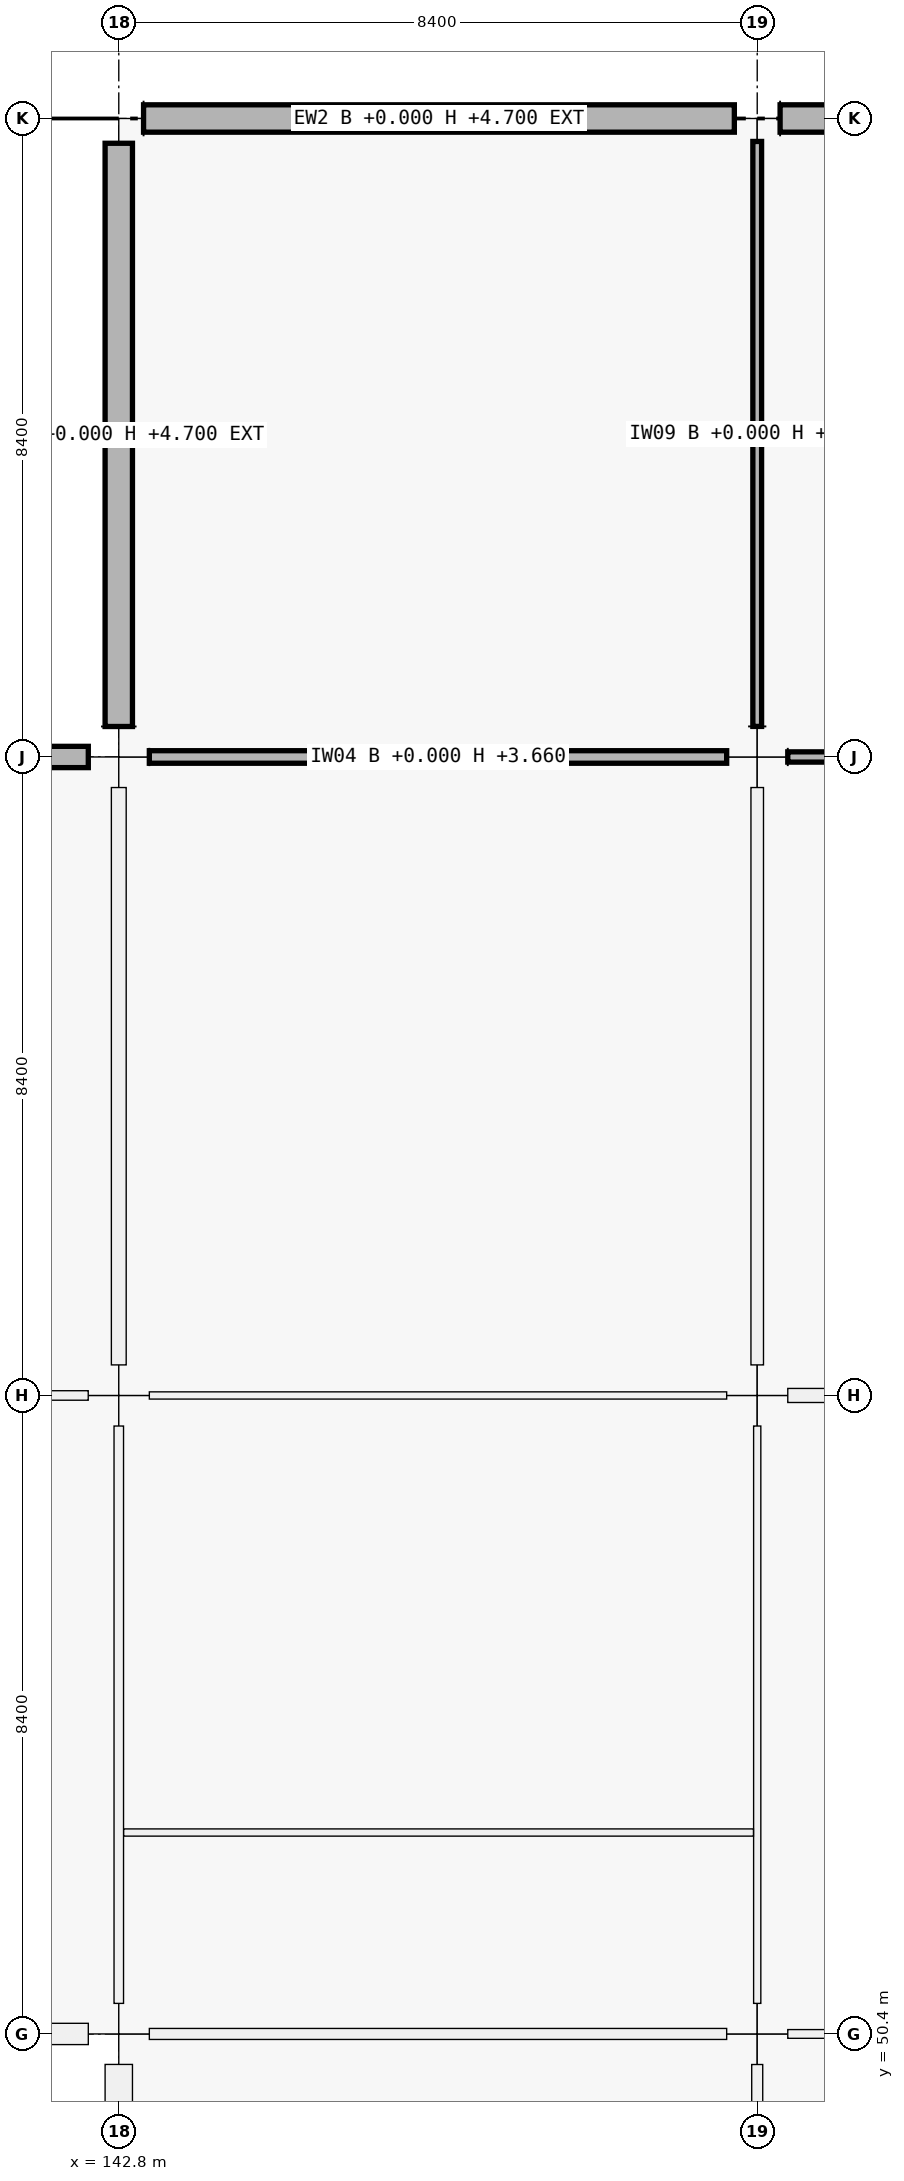
"""IFC4 building model, lengths in metres.
Left out: names, types, materials, properties, quantities, classifications, styles, units other than length and angle.
Written with IfcOpenShell. Run it as: python <this file> out.ifc"""

import sys

from ifc_helpers import new_model, si_unit, direction, frame, frame_2d, origin, origin_2d, place, context, subcontext, project, spatial, rectangle, extrude, element, fill, save


model = new_model("IFC4")
c1 = context("Model", 3, precision=1e-05, world=origin(), true_north=direction((0.0, 1.0)))
c2 = subcontext(c1, "Body", "Model", "MODEL_VIEW")
j1 = project(units=[si_unit("LENGTHUNIT", "METRE"), si_unit("PLANEANGLEUNIT", "RADIAN")], contexts=[c1])
p1 = place(None, origin())
s1 = spatial("IfcSite", under=j1, at=p1, CompositionType="ELEMENT")
p2 = place(p1, origin())
s2 = spatial("IfcBuilding", under=s1, at=p2, CompositionType="ELEMENT")
p3 = place(p2, origin())
s3 = spatial("IfcBuildingStorey", under=s2, at=p3, CompositionType="ELEMENT", Elevation=0.0)
for number, where, z_axis, x_axis in (
    (1, (142.8, 50.4, 0.0), (0.0, 0.0, 1.0), (1.0, 0.0, 0.0)),
    (2, (142.8, 58.8, 0.0), (0.0, 0.0, 1.0), (1.0, 0.0, 0.0)),
    (3, (142.8, 67.2, 0.0), (0.0, 0.0, 1.0), (1.0, 0.0, 0.0)),
):
    element("IfcColumn", number, at=place(p3, frame(where, z_axis=z_axis, x_axis=x_axis)), inside=s3, PredefinedType="COLUMN", context=c2, shape_type="SweptSolid", body=[
        extrude(rectangle(XDim=0.8, YDim=0.8, at=origin_2d()), origin(), (0.0, 0.0, 1.0), 5.76),
    ])
p4 = place(p3, frame((142.8, 75.6, 0.0), z_axis=(0.0, 0.0, 1.0), x_axis=(1.0, 0.0, 0.0)))
e4 = element("IfcColumn", 4, at=p4, inside=s3, PredefinedType="COLUMN", context=c2, shape_type="SweptSolid", body=[
    extrude(rectangle(XDim=0.65, YDim=0.65, at=origin_2d()), origin(), (0.0, 0.0, 1.0), 5.76),
])
for number, where, z_axis, x_axis in (
    (5, (151.2, 50.4, 0.0), (0.0, 0.0, 1.0), (1.0, 0.0, 0.0)),
    (6, (151.2, 58.8, 0.0), (0.0, 0.0, 1.0), (1.0, 0.0, 0.0)),
    (7, (151.2, 67.2, 0.0), (0.0, 0.0, 1.0), (1.0, 0.0, 0.0)),
):
    element("IfcColumn", number, at=place(p3, frame(where, z_axis=z_axis, x_axis=x_axis)), inside=s3, PredefinedType="COLUMN", context=c2, shape_type="SweptSolid", body=[
        extrude(rectangle(XDim=0.8, YDim=0.8, at=origin_2d()), origin(), (0.0, 0.0, 1.0), 5.76),
    ])
p5 = place(p3, frame((151.2, 75.6, 0.0), z_axis=(0.0, 0.0, 1.0), x_axis=(1.0, 0.0, 0.0)))
e8 = element("IfcColumn", 8, at=p5, inside=s3, PredefinedType="COLUMN", context=c2, shape_type="SweptSolid", body=[
    extrude(rectangle(XDim=0.6, YDim=0.6, at=origin_2d()), origin(), (0.0, 0.0, 1.0), 5.76),
])
p6 = place(p3, frame((142.399, 50.4, 0.0), z_axis=(0.0, 0.0, 1.0), x_axis=(-1.0, 0.0, 0.0)))
e9 = element("IfcWall", 9, at=p6, inside=s3, PredefinedType="SOLIDWALL", context=c2, shape_type="SweptSolid", body=[
    extrude(rectangle(XDim=7.598, YDim=0.28, at=frame_2d((3.799, 0.0))), origin(), (0.0, 0.0, 1.0), 4.7),
])
p7 = place(p3, frame((134.776, 67.2, 0.0), z_axis=(0.0, 0.0, 1.0), x_axis=(1.0, 0.0, 0.0)))
e10 = element("IfcWall", 10, at=p7, inside=s3, PredefinedType="SOLIDWALL", context=c2, shape_type="SweptSolid", body=[
    extrude(rectangle(XDim=7.623, YDim=0.28, at=frame_2d((3.812, 0.0))), origin(), (0.0, 0.0, 1.0), 4.7),
])
p8 = place(p7, frame((2.537, 0.0, 0.9)))
e11 = element("IfcOpeningElement", 11, at=p8, cuts=e10, PredefinedType="OPENING", context=c2, shape_type="SweptSolid", body=[
    extrude(rectangle(XDim=2.55, YDim=1.95, at=frame_2d((1.275, 0.975))), frame((0.0, 0.14, 0.0), z_axis=(0.0, -1.0, 0.0), x_axis=(1.0, 0.0, 0.0)), (0.0, 0.0, 1.0), 0.28),
])
p9 = place(p3, frame((142.8, 42.401, 0.0), z_axis=(0.0, 0.0, 1.0), x_axis=(0.0, 1.0, 0.0)))
e12 = element("IfcWall", 12, at=p9, inside=s3, PredefinedType="SOLIDWALL", context=c2, shape_type="SweptSolid", body=[
    extrude(rectangle(XDim=7.598, YDim=0.36, at=frame_2d((3.799, 0.0))), origin(), (0.0, 0.0, 1.0), 4.7),
])
p10 = place(p9, frame((2.574, 0.0, 0.9)))
e13 = element("IfcOpeningElement", 13, at=p10, cuts=e12, PredefinedType="OPENING", context=c2, shape_type="SweptSolid", body=[
    extrude(rectangle(XDim=2.45, YDim=1.45, at=frame_2d((1.225, 0.725))), frame((0.0, 0.18, 0.0), z_axis=(0.0, -1.0, 0.0), x_axis=(1.0, 0.0, 0.0)), (0.0, 0.0, 1.0), 0.36),
])
p11 = place(p3, frame((142.8, 67.601, 0.0), z_axis=(0.0, 0.0, 1.0), x_axis=(0.0, 1.0, 0.0)))
e14 = element("IfcWall", 14, at=p11, inside=s3, PredefinedType="SOLIDWALL", context=c2, shape_type="SweptSolid", body=[
    extrude(rectangle(XDim=7.673, YDim=0.36, at=frame_2d((3.836, 0.0))), origin(), (0.0, 0.0, 1.0), 4.7),
])
p12 = place(p11, frame((2.937, 0.0, 0.9)))
e15 = element("IfcOpeningElement", 15, at=p12, cuts=e14, PredefinedType="OPENING", context=c2, shape_type="SweptSolid", body=[
    extrude(rectangle(XDim=1.8, YDim=1.8, at=frame_2d((0.9, 0.9))), frame((0.0, 0.18, 0.0), z_axis=(0.0, -1.0, 0.0), x_axis=(1.0, 0.0, 0.0)), (0.0, 0.0, 1.0), 0.36),
])
p13 = place(p3, frame((143.126, 75.6, 0.0), z_axis=(0.0, 0.0, 1.0), x_axis=(1.0, 0.0, 0.0)))
e16 = element("IfcWall", 16, at=p13, inside=s3, PredefinedType="SOLIDWALL", context=c2, shape_type="SweptSolid", body=[
    extrude(rectangle(XDim=7.773, YDim=0.36, at=frame_2d((3.886, 0.0))), origin(), (0.0, 0.0, 1.0), 4.7),
])
p14 = place(p13, frame((2.837, 0.0, 0.9)))
e17 = element("IfcOpeningElement", 17, at=p14, cuts=e16, PredefinedType="OPENING", context=c2, shape_type="SweptSolid", body=[
    extrude(rectangle(XDim=2.1, YDim=1.8, at=frame_2d((1.05, 0.9))), frame((0.0, 0.18, 0.0), z_axis=(0.0, -1.0, 0.0), x_axis=(1.0, 0.0, 0.0)), (0.0, 0.0, 1.0), 0.36),
])
p15 = place(p3, frame((151.501, 75.6, 0.0), z_axis=(0.0, 0.0, 1.0), x_axis=(1.0, 0.0, 0.0)))
e18 = element("IfcWall", 18, at=p15, inside=s3, PredefinedType="SOLIDWALL", context=c2, shape_type="SweptSolid", body=[
    extrude(rectangle(XDim=7.773, YDim=0.36, at=frame_2d((3.886, 0.0))), origin(), (0.0, 0.0, 1.0), 4.7),
])
p16 = place(p15, frame((2.686, 0.0, 0.9)))
e19 = element("IfcOpeningElement", 19, at=p16, cuts=e18, PredefinedType="OPENING", context=c2, shape_type="SweptSolid", body=[
    extrude(rectangle(XDim=2.4, YDim=1.8, at=frame_2d((1.2, 0.9))), frame((0.0, 0.18, 0.0), z_axis=(0.0, -1.0, 0.0), x_axis=(1.0, 0.0, 0.0)), (0.0, 0.0, 1.0), 0.36),
])
p17 = place(p3, frame((134.802, 58.8, 0.0), z_axis=(0.0, 0.0, 1.0), x_axis=(1.0, 0.0, 0.0)))
e20 = element("IfcWall", 20, at=p17, inside=s3, PredefinedType="PARTITIONING", context=c2, shape_type="SweptSolid", body=[
    extrude(rectangle(XDim=7.596, YDim=0.125, at=frame_2d((3.798, 0.0))), origin(), (0.0, 0.0, 1.0), 3.66),
])
p18 = place(p17, frame((3.293, 0.0, 0.0)))
e21 = element("IfcOpeningElement", 21, at=p18, cuts=e20, PredefinedType="OPENING", context=c2, shape_type="SweptSolid", body=[
    extrude(rectangle(XDim=1.01, YDim=2.12, at=frame_2d((0.505, 1.06))), frame((0.0, 0.062, 0.0), z_axis=(0.0, -1.0, 0.0), x_axis=(1.0, 0.0, 0.0)), (0.0, 0.0, 1.0), 0.125),
])
p19 = place(p3, frame((143.202, 50.4, 0.0), z_axis=(0.0, 0.0, 1.0), x_axis=(1.0, 0.0, 0.0)))
e22 = element("IfcWall", 22, at=p19, inside=s3, PredefinedType="PARTITIONING", context=c2, shape_type="SweptSolid", body=[
    extrude(rectangle(XDim=7.596, YDim=0.145, at=frame_2d((3.798, 0.0))), origin(), (0.0, 0.0, 1.0), 3.66),
])
p20 = place(p3, frame((143.202, 58.8, 0.0), z_axis=(0.0, 0.0, 1.0), x_axis=(1.0, 0.0, 0.0)))
e23 = element("IfcWall", 23, at=p20, inside=s3, PredefinedType="PARTITIONING", context=c2, shape_type="SweptSolid", body=[
    extrude(rectangle(XDim=7.596, YDim=0.095, at=frame_2d((3.798, 0.0))), origin(), (0.0, 0.0, 1.0), 3.66),
])
p21 = place(p3, frame((143.202, 67.2, 0.0), z_axis=(0.0, 0.0, 1.0), x_axis=(1.0, 0.0, 0.0)))
e24 = element("IfcWall", 24, at=p21, inside=s3, PredefinedType="PARTITIONING", context=c2, shape_type="SweptSolid", body=[
    extrude(rectangle(XDim=7.596, YDim=0.165, at=frame_2d((3.798, 0.0))), origin(), (0.0, 0.0, 1.0), 3.66),
])
p22 = place(p21, frame((3.278, 0.0, 0.0)))
e25 = element("IfcOpeningElement", 25, at=p22, cuts=e24, PredefinedType="OPENING", context=c2, shape_type="SweptSolid", body=[
    extrude(rectangle(XDim=1.04, YDim=2.2, at=frame_2d((0.52, 1.1))), frame((0.0, 0.083, 0.0), z_axis=(0.0, -1.0, 0.0), x_axis=(1.0, 0.0, 0.0)), (0.0, 0.0, 1.0), 0.165),
])
p23 = place(p3, frame((151.602, 50.4, 0.0), z_axis=(0.0, 0.0, 1.0), x_axis=(1.0, 0.0, 0.0)))
e26 = element("IfcWall", 26, at=p23, inside=s3, PredefinedType="PARTITIONING", context=c2, shape_type="SweptSolid", body=[
    extrude(rectangle(XDim=7.596, YDim=0.115, at=frame_2d((3.798, 0.0))), origin(), (0.0, 0.0, 1.0), 3.66),
])
p24 = place(p23, frame((3.308, 0.0, 0.0)))
e27 = element("IfcOpeningElement", 27, at=p24, cuts=e26, PredefinedType="OPENING", context=c2, shape_type="SweptSolid", body=[
    extrude(rectangle(XDim=0.98, YDim=2.18, at=frame_2d((0.49, 1.09))), frame((0.0, 0.058, 0.0), z_axis=(0.0, -1.0, 0.0), x_axis=(1.0, 0.0, 0.0)), (0.0, 0.0, 1.0), 0.115),
])
p25 = place(p3, frame((151.602, 58.8, 0.0), z_axis=(0.0, 0.0, 1.0), x_axis=(1.0, 0.0, 0.0)))
e28 = element("IfcWall", 28, at=p25, inside=s3, PredefinedType="PARTITIONING", context=c2, shape_type="SweptSolid", body=[
    extrude(rectangle(XDim=7.596, YDim=0.185, at=frame_2d((3.798, 0.0))), origin(), (0.0, 0.0, 1.0), 3.66),
])
p26 = place(p25, frame((3.318, 0.0, 0.0)))
e29 = element("IfcOpeningElement", 29, at=p26, cuts=e28, PredefinedType="OPENING", context=c2, shape_type="SweptSolid", body=[
    extrude(rectangle(XDim=0.96, YDim=2.18, at=frame_2d((0.48, 1.09))), frame((0.0, 0.093, 0.0), z_axis=(0.0, -1.0, 0.0), x_axis=(1.0, 0.0, 0.0)), (0.0, 0.0, 1.0), 0.185),
])
p27 = place(p3, frame((151.602, 67.2, 0.0), z_axis=(0.0, 0.0, 1.0), x_axis=(1.0, 0.0, 0.0)))
e30 = element("IfcWall", 30, at=p27, inside=s3, PredefinedType="PARTITIONING", context=c2, shape_type="SweptSolid", body=[
    extrude(rectangle(XDim=7.596, YDim=0.135, at=frame_2d((3.798, 0.0))), origin(), (0.0, 0.0, 1.0), 3.66),
])
p28 = place(p27, frame((3.328, 0.0, 0.0)))
e31 = element("IfcOpeningElement", 31, at=p28, cuts=e30, PredefinedType="OPENING", context=c2, shape_type="SweptSolid", body=[
    extrude(rectangle(XDim=0.94, YDim=2.15, at=frame_2d((0.47, 1.075))), frame((0.0, 0.067, 0.0), z_axis=(0.0, -1.0, 0.0), x_axis=(1.0, 0.0, 0.0)), (0.0, 0.0, 1.0), 0.135),
])
p29 = place(p3, frame((142.8, 50.802, 0.0), z_axis=(0.0, 0.0, 1.0), x_axis=(0.0, 1.0, 0.0)))
e32 = element("IfcWall", 32, at=p29, inside=s3, PredefinedType="PARTITIONING", context=c2, shape_type="SweptSolid", body=[
    extrude(rectangle(XDim=7.596, YDim=0.125, at=frame_2d((3.798, 0.0))), origin(), (0.0, 0.0, 1.0), 3.66),
])
p30 = place(p29, frame((0.593, 0.0, 0.0)))
e33 = element("IfcOpeningElement", 33, at=p30, cuts=e32, PredefinedType="OPENING", context=c2, shape_type="SweptSolid", body=[
    extrude(rectangle(XDim=0.94, YDim=2.08, at=frame_2d((0.47, 1.04))), frame((0.0, 0.062, 0.0), z_axis=(0.0, -1.0, 0.0), x_axis=(1.0, 0.0, 0.0)), (0.0, 0.0, 1.0), 0.125),
])
p31 = place(p29, frame((4.503, 0.0, 0.0)))
e34 = element("IfcOpeningElement", 34, at=p31, cuts=e32, PredefinedType="OPENING", context=c2, shape_type="SweptSolid", body=[
    extrude(rectangle(XDim=0.96, YDim=2.1, at=frame_2d((0.48, 1.05))), frame((0.0, 0.062, 0.0), z_axis=(0.0, -1.0, 0.0), x_axis=(1.0, 0.0, 0.0)), (0.0, 0.0, 1.0), 0.125),
])
p32 = place(p3, frame((142.8, 59.202, 0.0), z_axis=(0.0, 0.0, 1.0), x_axis=(0.0, 1.0, 0.0)))
e35 = element("IfcWall", 35, at=p32, inside=s3, PredefinedType="PARTITIONING", context=c2, shape_type="SweptSolid", body=[
    extrude(rectangle(XDim=7.596, YDim=0.195, at=frame_2d((3.798, 0.0))), origin(), (0.0, 0.0, 1.0), 3.66),
])
p33 = place(p32, frame((3.268, 0.0, 0.0)))
e36 = element("IfcOpeningElement", 36, at=p33, cuts=e35, PredefinedType="OPENING", context=c2, shape_type="SweptSolid", body=[
    extrude(rectangle(XDim=1.06, YDim=2.25, at=frame_2d((0.53, 1.125))), frame((0.0, 0.098, 0.0), z_axis=(0.0, -1.0, 0.0), x_axis=(1.0, 0.0, 0.0)), (0.0, 0.0, 1.0), 0.195),
])
p34 = place(p3, frame((151.2, 42.352, 0.0), z_axis=(0.0, 0.0, 1.0), x_axis=(0.0, 1.0, 0.0)))
e37 = element("IfcWall", 37, at=p34, inside=s3, PredefinedType="PARTITIONING", context=c2, shape_type="SweptSolid", body=[
    extrude(rectangle(XDim=7.646, YDim=0.145, at=frame_2d((3.823, 0.0))), origin(), (0.0, 0.0, 1.0), 3.66),
])
p35 = place(p34, frame((3.333, 0.0, 0.0)))
e38 = element("IfcOpeningElement", 38, at=p35, cuts=e37, PredefinedType="OPENING", context=c2, shape_type="SweptSolid", body=[
    extrude(rectangle(XDim=0.98, YDim=2.18, at=frame_2d((0.49, 1.09))), frame((0.0, 0.073, 0.0), z_axis=(0.0, -1.0, 0.0), x_axis=(1.0, 0.0, 0.0)), (0.0, 0.0, 1.0), 0.145),
])
p36 = place(p3, frame((151.2, 50.802, 0.0), z_axis=(0.0, 0.0, 1.0), x_axis=(0.0, 1.0, 0.0)))
e39 = element("IfcWall", 39, at=p36, inside=s3, PredefinedType="PARTITIONING", context=c2, shape_type="SweptSolid", body=[
    extrude(rectangle(XDim=7.596, YDim=0.095, at=frame_2d((3.798, 0.0))), origin(), (0.0, 0.0, 1.0), 3.66),
])
p37 = place(p3, frame((151.2, 59.202, 0.0), z_axis=(0.0, 0.0, 1.0), x_axis=(0.0, 1.0, 0.0)))
e40 = element("IfcWall", 40, at=p37, inside=s3, PredefinedType="PARTITIONING", context=c2, shape_type="SweptSolid", body=[
    extrude(rectangle(XDim=7.596, YDim=0.165, at=frame_2d((3.798, 0.0))), origin(), (0.0, 0.0, 1.0), 3.66),
])
p38 = place(p37, frame((3.318, 0.0, 0.0)))
e41 = element("IfcOpeningElement", 41, at=p38, cuts=e40, PredefinedType="OPENING", context=c2, shape_type="SweptSolid", body=[
    extrude(rectangle(XDim=0.96, YDim=2.18, at=frame_2d((0.48, 1.09))), frame((0.0, 0.083, 0.0), z_axis=(0.0, -1.0, 0.0), x_axis=(1.0, 0.0, 0.0)), (0.0, 0.0, 1.0), 0.165),
])
p39 = place(p3, frame((151.2, 67.602, 0.0), z_axis=(0.0, 0.0, 1.0), x_axis=(0.0, 1.0, 0.0)))
e42 = element("IfcWall", 42, at=p39, inside=s3, PredefinedType="PARTITIONING", context=c2, shape_type="SweptSolid", body=[
    extrude(rectangle(XDim=7.696, YDim=0.115, at=frame_2d((3.848, 0.0))), origin(), (0.0, 0.0, 1.0), 3.66),
])
p40 = place(p39, frame((3.378, 0.0, 0.0)))
e43 = element("IfcOpeningElement", 43, at=p40, cuts=e42, PredefinedType="OPENING", context=c2, shape_type="SweptSolid", body=[
    extrude(rectangle(XDim=0.94, YDim=2.15, at=frame_2d((0.47, 1.075))), frame((0.0, 0.058, 0.0), z_axis=(0.0, -1.0, 0.0), x_axis=(1.0, 0.0, 0.0)), (0.0, 0.0, 1.0), 0.115),
])
p41 = place(p3, frame((142.865, 53.05, 0.0), z_axis=(0.0, 0.0, 1.0), x_axis=(1.0, 0.0, 0.0)))
e44 = element("IfcWall", 44, at=p41, inside=s3, PredefinedType="PARTITIONING", context=c2, shape_type="SweptSolid", body=[
    extrude(rectangle(XDim=8.286, YDim=0.095, at=frame_2d((4.143, 0.0))), origin(), (0.0, 0.0, 1.0), 3.66),
])
p42 = place(p12, origin())
e45 = element("IfcWindow", 45, at=p42, inside=s3, PartitioningType="SINGLE_PANEL", PredefinedType="WINDOW", context=c2, shape_type="SweptSolid", body=[
    extrude(rectangle(XDim=1.8, YDim=1.8, at=frame_2d((0.9, 0.9))), frame((0.0, 0.03, 0.0), z_axis=(0.0, -1.0, 0.0), x_axis=(1.0, 0.0, 0.0)), (0.0, 0.0, 1.0), 0.06),
])
fill(e15, e45)
p43 = place(p14, origin())
e46 = element("IfcWindow", 46, at=p43, inside=s3, PartitioningType="SINGLE_PANEL", PredefinedType="WINDOW", context=c2, shape_type="SweptSolid", body=[
    extrude(rectangle(XDim=2.1, YDim=1.8, at=frame_2d((1.05, 0.9))), frame((0.0, 0.03, 0.0), z_axis=(0.0, -1.0, 0.0), x_axis=(1.0, 0.0, 0.0)), (0.0, 0.0, 1.0), 0.06),
])
fill(e17, e46)
p44 = place(p30, origin())
e47 = element("IfcDoor", 47, at=p44, inside=s3, OperationType="SINGLE_SWING_LEFT", PredefinedType="DOOR", context=c2, shape_type="SweptSolid", body=[
    extrude(rectangle(XDim=0.94, YDim=2.08, at=frame_2d((0.47, 1.04))), frame((0.0, 0.025, 0.0), z_axis=(0.0, -1.0, 0.0), x_axis=(1.0, 0.0, 0.0)), (0.0, 0.0, 1.0), 0.05),
])
fill(e33, e47)
p45 = place(p31, origin())
e48 = element("IfcDoor", 48, at=p45, inside=s3, OperationType="SINGLE_SWING_RIGHT", PredefinedType="DOOR", context=c2, shape_type="SweptSolid", body=[
    extrude(rectangle(XDim=0.96, YDim=2.1, at=frame_2d((0.48, 1.05))), frame((0.0, 0.025, 0.0), z_axis=(0.0, -1.0, 0.0), x_axis=(1.0, 0.0, 0.0)), (0.0, 0.0, 1.0), 0.05),
])
fill(e34, e48)
p46 = place(p22, origin())
e49 = element("IfcDoor", 49, at=p46, inside=s3, OperationType="SINGLE_SWING_LEFT", PredefinedType="DOOR", context=c2, shape_type="SweptSolid", body=[
    extrude(rectangle(XDim=1.04, YDim=2.2, at=frame_2d((0.52, 1.1))), frame((0.0, 0.025, 0.0), z_axis=(0.0, -1.0, 0.0), x_axis=(1.0, 0.0, 0.0)), (0.0, 0.0, 1.0), 0.05),
])
fill(e25, e49)
p47 = place(p33, origin())
e50 = element("IfcDoor", 50, at=p47, inside=s3, OperationType="SINGLE_SWING_LEFT", PredefinedType="DOOR", context=c2, shape_type="SweptSolid", body=[
    extrude(rectangle(XDim=1.06, YDim=2.25, at=frame_2d((0.53, 1.125))), frame((0.0, 0.025, 0.0), z_axis=(0.0, -1.0, 0.0), x_axis=(1.0, 0.0, 0.0)), (0.0, 0.0, 1.0), 0.05),
])
fill(e36, e50)
p48 = place(p38, origin())
e51 = element("IfcDoor", 51, at=p48, inside=s3, OperationType="SINGLE_SWING_RIGHT", PredefinedType="DOOR", context=c2, shape_type="SweptSolid", body=[
    extrude(rectangle(XDim=0.96, YDim=2.18, at=frame_2d((0.48, 1.09))), frame((0.0, 0.025, 0.0), z_axis=(0.0, -1.0, 0.0), x_axis=(1.0, 0.0, 0.0)), (0.0, 0.0, 1.0), 0.05),
])
fill(e41, e51)
p49 = place(p40, origin())
e52 = element("IfcDoor", 52, at=p49, inside=s3, OperationType="SINGLE_SWING_LEFT", PredefinedType="DOOR", context=c2, shape_type="SweptSolid", body=[
    extrude(rectangle(XDim=0.94, YDim=2.15, at=frame_2d((0.47, 1.075))), frame((0.0, 0.025, 0.0), z_axis=(0.0, -1.0, 0.0), x_axis=(1.0, 0.0, 0.0)), (0.0, 0.0, 1.0), 0.05),
])
fill(e43, e52)
save(model, sys.argv[1])
